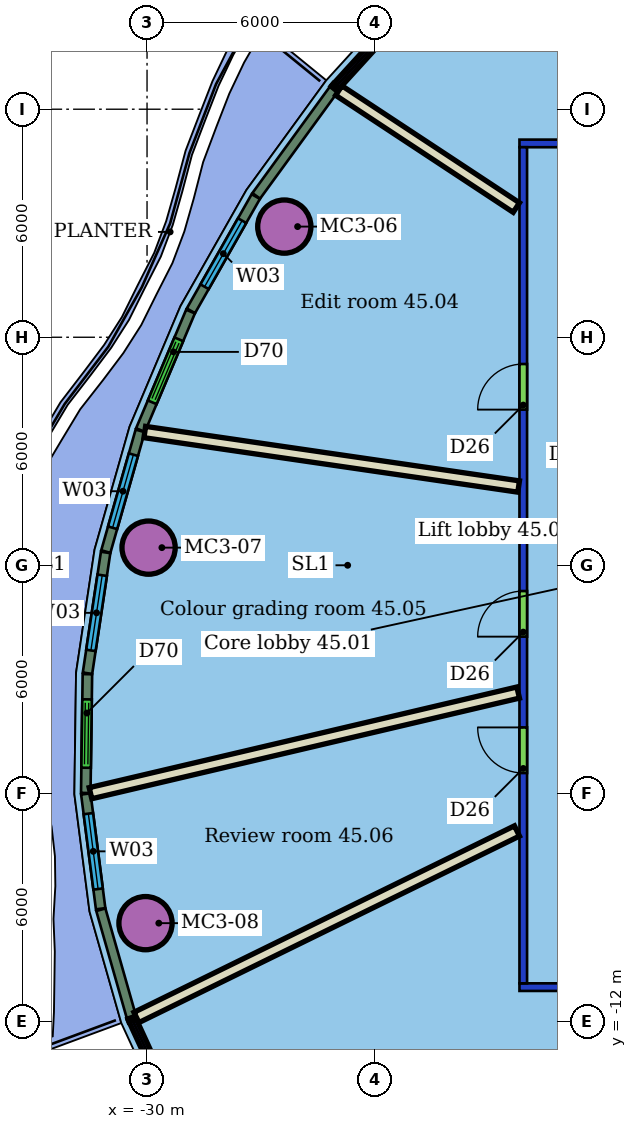
"""IFC4 building model, lengths in metres.
Left out: names, types, materials, properties, quantities, classifications, styles, units other than length and angle.
Written with IfcOpenShell. Run it as: python <this file> out.ifc"""

import sys

from ifc_helpers import new_model, si_unit, direction, frame, frame_2d, origin, origin_2d, place, context, subcontext, project, spatial, rectangle, hollow_circle, extrude, element, fill, save


model = new_model("IFC4")
c1 = context("Model", 3, precision=1e-05, world=origin(), true_north=direction((0.0, 1.0)))
c2 = subcontext(c1, "Body", "Model", "MODEL_VIEW")
j1 = project(units=[si_unit("LENGTHUNIT", "METRE"), si_unit("PLANEANGLEUNIT", "RADIAN")], contexts=[c1])
p1 = place(None, origin())
s1 = spatial("IfcSite", under=j1, at=p1, CompositionType="ELEMENT")
p2 = place(p1, origin())
s2 = spatial("IfcBuilding", under=s1, at=p2, CompositionType="ELEMENT")
p3 = place(p2, frame((0.0, 0.0, 186.6)))
s3 = spatial("IfcBuildingStorey", under=s2, at=p3, CompositionType="ELEMENT", Elevation=186.6)
for number, where, z_axis, x_axis in (
    (1, (-26.388, 8.912, 0.0), (0.0, 0.0, 1.0), (1.0, 0.0, 0.0)),
    (2, (-29.959, 0.464, 0.0), (0.0, 0.0, 1.0), (1.0, 0.0, 0.0)),
    (3, (-30.041, -9.417, 0.0), (0.0, 0.0, 1.0), (1.0, 0.0, 0.0)),
):
    element("IfcColumn", number, at=place(p3, frame(where, z_axis=z_axis, x_axis=x_axis)), inside=s3, PredefinedType="COLUMN", context=c2, shape_type="SweptSolid", body=[
        extrude(hollow_circle(Radius=0.7, WallThickness=0.05, at=origin_2d()), origin(), (0.0, 0.0, 1.0), 3.4),
    ])
p4 = place(p3, frame((8.2, -11.1, 0.0), z_axis=(0.0, 0.0, 1.0), x_axis=(-1.0, 0.0, 0.0)))
e4 = element("IfcWall", 4, at=p4, inside=s3, PredefinedType="PARTITIONING", context=c2, shape_type="SweptSolid", body=[
    extrude(rectangle(XDim=28.4, YDim=0.2, at=frame_2d((14.2, 0.0))), origin(), (0.0, 0.0, 1.0), 3.0),
])
p5 = place(p4, frame((22.019, 0.0, 0.0)))
e5 = element("IfcOpeningElement", 5, at=p5, cuts=e4, PredefinedType="OPENING", context=c2, shape_type="SweptSolid", body=[
    extrude(rectangle(XDim=1.8, YDim=2.1, at=frame_2d((0.9, 1.05))), frame((0.0, 0.11, 0.0), z_axis=(0.0, -1.0, 0.0), x_axis=(1.0, 0.0, 0.0)), (0.0, 0.0, 1.0), 0.22),
])
p6 = place(p4, frame((14.8, 0.0, 0.0)))
e6 = element("IfcOpeningElement", 6, at=p6, cuts=e4, PredefinedType="OPENING", context=c2, shape_type="SweptSolid", body=[
    extrude(rectangle(XDim=1.8, YDim=2.1, at=frame_2d((0.9, 1.05))), frame((0.0, 0.11, 0.0), z_axis=(0.0, -1.0, 0.0), x_axis=(1.0, 0.0, 0.0)), (0.0, 0.0, 1.0), 0.22),
])
p7 = place(p4, frame((5.278, 0.0, 0.0)))
e7 = element("IfcOpeningElement", 7, at=p7, cuts=e4, PredefinedType="OPENING", context=c2, shape_type="SweptSolid", body=[
    extrude(rectangle(XDim=1.0, YDim=2.1, at=frame_2d((0.5, 1.05))), frame((0.0, 0.11, 0.0), z_axis=(0.0, -1.0, 0.0), x_axis=(1.0, 0.0, 0.0)), (0.0, 0.0, 1.0), 0.22),
])
p8 = place(p3, frame((-20.1, -11.0, 0.0), z_axis=(0.0, 0.0, 1.0), x_axis=(0.0, 1.0, 0.0)))
e8 = element("IfcWall", 8, at=p8, inside=s3, PredefinedType="PARTITIONING", context=c2, shape_type="SweptSolid", body=[
    extrude(rectangle(XDim=22.0, YDim=0.2, at=frame_2d((11.0, 0.0))), origin(), (0.0, 0.0, 1.0), 3.0),
])
p9 = place(p8, frame((15.096, 0.0, 0.0)))
e9 = element("IfcOpeningElement", 9, at=p9, cuts=e8, PredefinedType="OPENING", context=c2, shape_type="SweptSolid", body=[
    extrude(rectangle(XDim=1.2, YDim=2.1, at=frame_2d((0.6, 1.05))), frame((0.0, 0.11, 0.0), z_axis=(0.0, -1.0, 0.0), x_axis=(1.0, 0.0, 0.0)), (0.0, 0.0, 1.0), 0.22),
])
p10 = place(p8, frame((9.122, 0.0, 0.0)))
e10 = element("IfcOpeningElement", 10, at=p10, cuts=e8, PredefinedType="OPENING", context=c2, shape_type="SweptSolid", body=[
    extrude(rectangle(XDim=1.2, YDim=2.1, at=frame_2d((0.6, 1.05))), frame((0.0, 0.11, 0.0), z_axis=(0.0, -1.0, 0.0), x_axis=(1.0, 0.0, 0.0)), (0.0, 0.0, 1.0), 0.22),
])
p11 = place(p8, frame((5.534, 0.0, 0.0)))
e11 = element("IfcOpeningElement", 11, at=p11, cuts=e8, PredefinedType="OPENING", context=c2, shape_type="SweptSolid", body=[
    extrude(rectangle(XDim=1.2, YDim=2.1, at=frame_2d((0.6, 1.05))), frame((0.0, 0.11, 0.0), z_axis=(0.0, -1.0, 0.0), x_axis=(1.0, 0.0, 0.0)), (0.0, 0.0, 1.0), 0.22),
])
p12 = place(p3, frame((-20.2, 11.1, 0.0), z_axis=(0.0, 0.0, 1.0), x_axis=(1.0, 0.0, 0.0)))
e12 = element("IfcWall", 12, at=p12, inside=s3, PredefinedType="PARTITIONING", context=c2, shape_type="SweptSolid", body=[
    extrude(rectangle(XDim=28.4, YDim=0.2, at=frame_2d((14.2, 0.0))), origin(), (0.0, 0.0, 1.0), 3.0),
])
p13 = place(p12, frame((19.009, 0.0, 0.0)))
e13 = element("IfcOpeningElement", 13, at=p13, cuts=e12, PredefinedType="OPENING", context=c2, shape_type="SweptSolid", body=[
    extrude(rectangle(XDim=1.8, YDim=2.1, at=frame_2d((0.9, 1.05))), frame((0.0, 0.11, 0.0), z_axis=(0.0, -1.0, 0.0), x_axis=(1.0, 0.0, 0.0)), (0.0, 0.0, 1.0), 0.22),
])
p14 = place(p12, frame((9.356, 0.0, 0.0)))
e14 = element("IfcOpeningElement", 14, at=p14, cuts=e12, PredefinedType="OPENING", context=c2, shape_type="SweptSolid", body=[
    extrude(rectangle(XDim=1.5, YDim=2.1, at=frame_2d((0.75, 1.05))), frame((0.0, 0.11, 0.0), z_axis=(0.0, -1.0, 0.0), x_axis=(1.0, 0.0, 0.0)), (0.0, 0.0, 1.0), 0.22),
])
p15 = place(p12, frame((4.725, 0.0, 0.0)))
e15 = element("IfcOpeningElement", 15, at=p15, cuts=e12, PredefinedType="OPENING", context=c2, shape_type="SweptSolid", body=[
    extrude(rectangle(XDim=0.9, YDim=2.1, at=frame_2d((0.45, 1.05))), frame((0.0, 0.11, 0.0), z_axis=(0.0, -1.0, 0.0), x_axis=(1.0, 0.0, 0.0)), (0.0, 0.0, 1.0), 0.22),
])
p16 = place(p12, frame((24.598, 0.0, 0.0)))
e16 = element("IfcOpeningElement", 16, at=p16, cuts=e12, PredefinedType="OPENING", context=c2, shape_type="SweptSolid", body=[
    extrude(rectangle(XDim=1.5, YDim=2.1, at=frame_2d((0.75, 1.05))), frame((0.0, 0.11, 0.0), z_axis=(0.0, -1.0, 0.0), x_axis=(1.0, 0.0, 0.0)), (0.0, 0.0, 1.0), 0.22),
])
p17 = place(p3, frame((-24.955, 12.492, 0.0), z_axis=(0.0, 0.0, 1.0), x_axis=(0.834978707923, -0.550282252408, 0.0)))
e17 = element("IfcWall", 17, at=p17, inside=s3, PredefinedType="PARTITIONING", context=c2, shape_type="SweptSolid", body=[
    extrude(rectangle(XDim=5.595, YDim=0.3, at=frame_2d((2.798, 0.0))), origin(), (0.0, 0.0, 1.0), 3.4),
])
p18 = place(p3, frame((-30.059, 3.506, 0.0), z_axis=(0.0, 0.0, 1.0), x_axis=(0.98954824444, -0.144202191124, 0.0)))
e18 = element("IfcWall", 18, at=p18, inside=s3, PredefinedType="PARTITIONING", context=c2, shape_type="SweptSolid", body=[
    extrude(rectangle(XDim=9.942, YDim=0.3, at=frame_2d((4.971, 0.0))), origin(), (0.0, 0.0, 1.0), 3.4),
])
p19 = place(p3, frame((-31.488, -5.997, 0.0), z_axis=(0.0, 0.0, 1.0), x_axis=(0.973420214801, 0.229026385853, 0.0)))
e19 = element("IfcWall", 19, at=p19, inside=s3, PredefinedType="PARTITIONING", context=c2, shape_type="SweptSolid", body=[
    extrude(rectangle(XDim=11.561, YDim=0.3, at=frame_2d((5.78, 0.0))), origin(), (0.0, 0.0, 1.0), 3.4),
])
p20 = place(p3, frame((-30.279, -11.897, 0.0), z_axis=(0.0, 0.0, 1.0), x_axis=(0.897980611591, 0.440035022704, 0.0)))
e20 = element("IfcWall", 20, at=p20, inside=s3, PredefinedType="PARTITIONING", context=c2, shape_type="SweptSolid", body=[
    extrude(rectangle(XDim=11.15, YDim=0.3, at=frame_2d((5.575, 0.0))), origin(), (0.0, 0.0, 1.0), 3.4),
])
p21 = place(p3, frame((-25.084, 12.526, 0.0), z_axis=(0.0, 0.0, 1.0), x_axis=(-0.588548101518, -0.808462202085, 0.0)))
e21 = element("IfcWall", 21, at=p21, inside=s3, PredefinedType="SOLIDWALL", context=c2, shape_type="SweptSolid", body=[
    extrude(rectangle(XDim=3.47, YDim=0.25, at=frame_2d((1.735, 0.0))), origin(), (0.0, 0.0, 1.0), 3.05),
])
p22 = place(p3, frame((-27.138, 9.702, 0.0), z_axis=(0.0, 0.0, 1.0), x_axis=(-0.493878356134, -0.869531005394, 0.0)))
e22 = element("IfcWall", 22, at=p22, inside=s3, PredefinedType="SOLIDWALL", context=c2, shape_type="SweptSolid", body=[
    extrude(rectangle(XDim=3.457, YDim=0.25, at=frame_2d((1.729, 0.0))), origin(), (0.0, 0.0, 1.0), 3.05),
])
p23 = place(p22, frame((0.728, 0.0, 0.9)))
e23 = element("IfcOpeningElement", 23, at=p23, cuts=e22, PredefinedType="OPENING", context=c2, shape_type="SweptSolid", body=[
    extrude(rectangle(XDim=2.0, YDim=2.1, at=frame_2d((1.0, 1.05))), frame((0.0, 0.135, 0.0), z_axis=(0.0, -1.0, 0.0), x_axis=(1.0, 0.0, 0.0)), (0.0, 0.0, 1.0), 0.27),
])
p24 = place(p3, frame((-28.856, 6.676, 0.0), z_axis=(0.0, 0.0, 1.0), x_axis=(-0.389133942351, -0.921181184627, 0.0)))
e24 = element("IfcWall", 24, at=p24, inside=s3, PredefinedType="SOLIDWALL", context=c2, shape_type="SweptSolid", body=[
    extrude(rectangle(XDim=3.384, YDim=0.25, at=frame_2d((1.692, 0.0))), origin(), (0.0, 0.0, 1.0), 3.05),
])
p25 = place(p24, frame((0.792, 0.0, 0.0)))
e25 = element("IfcOpeningElement", 25, at=p25, cuts=e24, PredefinedType="OPENING", context=c2, shape_type="SweptSolid", body=[
    extrude(rectangle(XDim=1.8, YDim=2.4, at=frame_2d((0.9, 1.2))), frame((0.0, 0.135, 0.0), z_axis=(0.0, -1.0, 0.0), x_axis=(1.0, 0.0, 0.0)), (0.0, 0.0, 1.0), 0.27),
])
p26 = place(p3, frame((-30.18, 3.536, 0.0), z_axis=(0.0, 0.0, 1.0), x_axis=(-0.273969029479, -0.961738514819, 0.0)))
e26 = element("IfcWall", 26, at=p26, inside=s3, PredefinedType="SOLIDWALL", context=c2, shape_type="SweptSolid", body=[
    extrude(rectangle(XDim=3.302, YDim=0.25, at=frame_2d((1.651, 0.0))), origin(), (0.0, 0.0, 1.0), 3.05),
])
p27 = place(p26, frame((0.651, 0.0, 0.9)))
e27 = element("IfcOpeningElement", 27, at=p27, cuts=e26, PredefinedType="OPENING", context=c2, shape_type="SweptSolid", body=[
    extrude(rectangle(XDim=2.0, YDim=2.1, at=frame_2d((1.0, 1.05))), frame((0.0, 0.135, 0.0), z_axis=(0.0, -1.0, 0.0), x_axis=(1.0, 0.0, 0.0)), (0.0, 0.0, 1.0), 0.27),
])
p28 = place(p3, frame((-31.09, 0.338, 0.0), z_axis=(0.0, 0.0, 1.0), x_axis=(-0.148522482612, -0.988909031286, 0.0)))
e28 = element("IfcWall", 28, at=p28, inside=s3, PredefinedType="SOLIDWALL", context=c2, shape_type="SweptSolid", body=[
    extrude(rectangle(XDim=3.214, YDim=0.25, at=frame_2d((1.607, 0.0))), origin(), (0.0, 0.0, 1.0), 3.05),
])
p29 = place(p28, frame((0.607, 0.0, 0.9)))
e29 = element("IfcOpeningElement", 29, at=p29, cuts=e28, PredefinedType="OPENING", context=c2, shape_type="SweptSolid", body=[
    extrude(rectangle(XDim=2.0, YDim=2.1, at=frame_2d((1.0, 1.05))), frame((0.0, 0.135, 0.0), z_axis=(0.0, -1.0, 0.0), x_axis=(1.0, 0.0, 0.0)), (0.0, 0.0, 1.0), 0.27),
])
p30 = place(p3, frame((-31.569, -2.865, 0.0), z_axis=(0.0, 0.0, 1.0), x_axis=(-0.013901648004, -0.999903367422, 0.0)))
e30 = element("IfcWall", 30, at=p30, inside=s3, PredefinedType="SOLIDWALL", context=c2, shape_type="SweptSolid", body=[
    extrude(rectangle(XDim=3.126, YDim=0.25, at=frame_2d((1.563, 0.0))), origin(), (0.0, 0.0, 1.0), 3.05),
])
p31 = place(p30, frame((0.663, 0.0, 0.0)))
e31 = element("IfcOpeningElement", 31, at=p31, cuts=e30, PredefinedType="OPENING", context=c2, shape_type="SweptSolid", body=[
    extrude(rectangle(XDim=1.8, YDim=2.4, at=frame_2d((0.9, 1.2))), frame((0.0, 0.135, 0.0), z_axis=(0.0, -1.0, 0.0), x_axis=(1.0, 0.0, 0.0)), (0.0, 0.0, 1.0), 0.27),
])
p32 = place(p3, frame((-31.611, -6.017, 0.0), z_axis=(0.0, 0.0, 1.0), x_axis=(0.128108697177, -0.991760133151, 0.0)))
e32 = element("IfcWall", 32, at=p32, inside=s3, PredefinedType="SOLIDWALL", context=c2, shape_type="SweptSolid", body=[
    extrude(rectangle(XDim=3.045, YDim=0.25, at=frame_2d((1.523, 0.0))), origin(), (0.0, 0.0, 1.0), 3.05),
])
p33 = place(p32, frame((0.523, 0.0, 0.9)))
e33 = element("IfcOpeningElement", 33, at=p33, cuts=e32, PredefinedType="OPENING", context=c2, shape_type="SweptSolid", body=[
    extrude(rectangle(XDim=2.0, YDim=2.1, at=frame_2d((1.0, 1.05))), frame((0.0, 0.135, 0.0), z_axis=(0.0, -1.0, 0.0), x_axis=(1.0, 0.0, 0.0)), (0.0, 0.0, 1.0), 0.27),
])
p34 = place(p3, frame((-31.216, -9.063, 0.0), z_axis=(0.0, 0.0, 1.0), x_axis=(0.273919515729, -0.96175261835, 0.0)))
e34 = element("IfcWall", 34, at=p34, inside=s3, PredefinedType="SOLIDWALL", context=c2, shape_type="SweptSolid", body=[
    extrude(rectangle(XDim=2.937, YDim=0.25, at=frame_2d((1.468, 0.0))), origin(), (0.0, 0.0, 1.0), 3.05),
])
p35 = place(p9, origin())
e35 = element("IfcDoor", 35, at=p35, inside=s3, OperationType="SINGLE_SWING_LEFT", PredefinedType="DOOR", context=c2, shape_type="SweptSolid", body=[
    extrude(rectangle(XDim=1.2, YDim=2.1, at=frame_2d((0.6, 1.05))), frame((0.0, 0.025, 0.0), z_axis=(0.0, -1.0, 0.0), x_axis=(1.0, 0.0, 0.0)), (0.0, 0.0, 1.0), 0.05),
])
fill(e9, e35)
p36 = place(p10, origin())
e36 = element("IfcDoor", 36, at=p36, inside=s3, OperationType="SINGLE_SWING_LEFT", PredefinedType="DOOR", context=c2, shape_type="SweptSolid", body=[
    extrude(rectangle(XDim=1.2, YDim=2.1, at=frame_2d((0.6, 1.05))), frame((0.0, 0.025, 0.0), z_axis=(0.0, -1.0, 0.0), x_axis=(1.0, 0.0, 0.0)), (0.0, 0.0, 1.0), 0.05),
])
fill(e10, e36)
p37 = place(p11, origin())
e37 = element("IfcDoor", 37, at=p37, inside=s3, OperationType="SINGLE_SWING_RIGHT", PredefinedType="DOOR", context=c2, shape_type="SweptSolid", body=[
    extrude(rectangle(XDim=1.2, YDim=2.1, at=frame_2d((0.6, 1.05))), frame((0.0, 0.025, 0.0), z_axis=(0.0, -1.0, 0.0), x_axis=(1.0, 0.0, 0.0)), (0.0, 0.0, 1.0), 0.05),
])
fill(e11, e37)
p38 = place(p23, origin())
e38 = element("IfcWindow", 38, at=p38, inside=s3, PartitioningType="SINGLE_PANEL", PredefinedType="WINDOW", context=c2, shape_type="SweptSolid", body=[
    extrude(rectangle(XDim=2.0, YDim=2.1, at=frame_2d((1.0, 1.05))), frame((0.0, 0.03, 0.0), z_axis=(0.0, -1.0, 0.0), x_axis=(1.0, 0.0, 0.0)), (0.0, 0.0, 1.0), 0.06),
])
fill(e23, e38)
p39 = place(p25, origin())
e39 = element("IfcDoor", 39, at=p39, inside=s3, OperationType="DOUBLE_DOOR_SLIDING", PredefinedType="DOOR", context=c2, shape_type="SweptSolid", body=[
    extrude(rectangle(XDim=1.8, YDim=2.4, at=frame_2d((0.9, 1.2))), frame((0.0, 0.025, 0.0), z_axis=(0.0, -1.0, 0.0), x_axis=(1.0, 0.0, 0.0)), (0.0, 0.0, 1.0), 0.05),
])
fill(e25, e39)
p40 = place(p27, origin())
e40 = element("IfcWindow", 40, at=p40, inside=s3, PartitioningType="SINGLE_PANEL", PredefinedType="WINDOW", context=c2, shape_type="SweptSolid", body=[
    extrude(rectangle(XDim=2.0, YDim=2.1, at=frame_2d((1.0, 1.05))), frame((0.0, 0.03, 0.0), z_axis=(0.0, -1.0, 0.0), x_axis=(1.0, 0.0, 0.0)), (0.0, 0.0, 1.0), 0.06),
])
fill(e27, e40)
p41 = place(p29, origin())
e41 = element("IfcWindow", 41, at=p41, inside=s3, PartitioningType="SINGLE_PANEL", PredefinedType="WINDOW", context=c2, shape_type="SweptSolid", body=[
    extrude(rectangle(XDim=2.0, YDim=2.1, at=frame_2d((1.0, 1.05))), frame((0.0, 0.03, 0.0), z_axis=(0.0, -1.0, 0.0), x_axis=(1.0, 0.0, 0.0)), (0.0, 0.0, 1.0), 0.06),
])
fill(e29, e41)
p42 = place(p31, origin())
e42 = element("IfcDoor", 42, at=p42, inside=s3, OperationType="DOUBLE_DOOR_SLIDING", PredefinedType="DOOR", context=c2, shape_type="SweptSolid", body=[
    extrude(rectangle(XDim=1.8, YDim=2.4, at=frame_2d((0.9, 1.2))), frame((0.0, 0.025, 0.0), z_axis=(0.0, -1.0, 0.0), x_axis=(1.0, 0.0, 0.0)), (0.0, 0.0, 1.0), 0.05),
])
fill(e31, e42)
p43 = place(p33, origin())
e43 = element("IfcWindow", 43, at=p43, inside=s3, PartitioningType="SINGLE_PANEL", PredefinedType="WINDOW", context=c2, shape_type="SweptSolid", body=[
    extrude(rectangle(XDim=2.0, YDim=2.1, at=frame_2d((1.0, 1.05))), frame((0.0, 0.03, 0.0), z_axis=(0.0, -1.0, 0.0), x_axis=(1.0, 0.0, 0.0)), (0.0, 0.0, 1.0), 0.06),
])
fill(e33, e43)
save(model, sys.argv[1])
